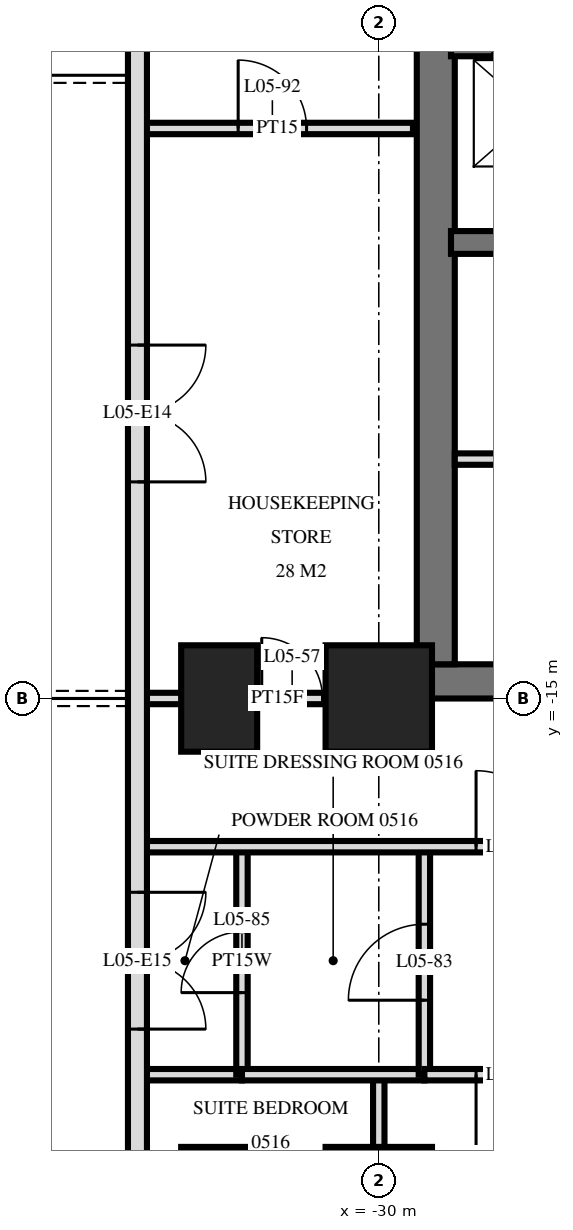
"""IFC4 building model, lengths in metres.
Left out: names, types, materials, properties, quantities, classifications, styles, units other than length and angle.
Written with IfcOpenShell. Run it as: python <this file> out.ifc"""

import sys

from ifc_helpers import new_model, si_unit, direction, frame, frame_2d, origin, origin_2d, place, context, subcontext, project, spatial, rectangle, extrude, element, fill, save


model = new_model("IFC4")
c1 = context("Model", 3, precision=1e-05, world=origin(), true_north=direction((0.0, 1.0)))
c2 = subcontext(c1, "Body", "Model", "MODEL_VIEW")
j1 = project(units=[si_unit("LENGTHUNIT", "METRE"), si_unit("PLANEANGLEUNIT", "RADIAN")], contexts=[c1])
p1 = place(None, origin())
s1 = spatial("IfcSite", under=j1, at=p1, CompositionType="ELEMENT")
p2 = place(p1, origin())
s2 = spatial("IfcBuilding", under=s1, at=p2, CompositionType="ELEMENT")
p3 = place(p2, frame((0.0, 0.0, 27.6)))
s3 = spatial("IfcBuildingStorey", under=s2, at=p3, CompositionType="ELEMENT", Elevation=27.6)
for number, where, z_axis, x_axis in (
    (1, (-32.1, -21.6, 0.0), (0.0, 0.0, 1.0), (0.0, 1.0, 0.0)),
    (2, (-32.1, -15.0, 0.0), (0.0, 0.0, 1.0), (0.0, 1.0, 0.0)),
):
    element("IfcColumn", number, at=place(p3, frame(where, z_axis=z_axis, x_axis=x_axis)), inside=s3, PredefinedType="COLUMN", context=c2, shape_type="SweptSolid", body=[
        extrude(rectangle(XDim=1.4, YDim=1.0, at=origin_2d()), origin(), (0.0, 0.0, 1.0), 3.6),
    ])
for number, where, z_axis, x_axis in (
    (3, (-30.0, -21.6, 0.0), (0.0, 0.0, 1.0), (1.0, 0.0, 0.0)),
    (4, (-30.0, -15.0, 0.0), (0.0, 0.0, 1.0), (1.0, 0.0, 0.0)),
):
    element("IfcColumn", number, at=place(p3, frame(where, z_axis=z_axis, x_axis=x_axis)), inside=s3, PredefinedType="COLUMN", context=c2, shape_type="SweptSolid", body=[
        extrude(rectangle(XDim=1.4, YDim=1.4, at=origin_2d()), origin(), (0.0, 0.0, 1.0), 3.6),
    ])
p4 = place(p3, frame((-29.5, -14.775, 0.0), z_axis=(0.0, 0.0, 1.0), x_axis=(1.0, 0.0, 0.0)))
e5 = element("IfcWall", 5, at=p4, inside=s3, PredefinedType="SHEAR", context=c2, shape_type="SweptSolid", body=[
    extrude(rectangle(XDim=19.5, YDim=0.45, at=frame_2d((9.75, 0.0))), origin(), (0.0, 0.0, 1.0), 3.6),
])
p5 = place(p4, frame((11.2, 0.0, 0.0)))
e6 = element("IfcOpeningElement", 6, at=p5, cuts=e5, PredefinedType="OPENING", context=c2, shape_type="SweptSolid", body=[
    extrude(rectangle(XDim=1.2, YDim=2.1, at=frame_2d((0.6, 1.05))), frame((0.0, 0.235, 0.0), z_axis=(0.0, -1.0, 0.0), x_axis=(1.0, 0.0, 0.0)), (0.0, 0.0, 1.0), 0.47),
])
p6 = place(p4, frame((14.25, 0.0, 0.0)))
e7 = element("IfcOpeningElement", 7, at=p6, cuts=e5, PredefinedType="OPENING", context=c2, shape_type="SweptSolid", body=[
    extrude(rectangle(XDim=1.1, YDim=2.1, at=frame_2d((0.55, 1.05))), frame((0.0, 0.235, 0.0), z_axis=(0.0, -1.0, 0.0), x_axis=(1.0, 0.0, 0.0)), (0.0, 0.0, 1.0), 0.47),
])
p7 = place(p4, frame((8.5, 0.0, 0.0)))
e8 = element("IfcOpeningElement", 8, at=p7, cuts=e5, PredefinedType="OPENING", context=c2, shape_type="SweptSolid", body=[
    extrude(rectangle(XDim=0.9, YDim=2.1, at=frame_2d((0.45, 1.05))), frame((0.0, 0.235, 0.0), z_axis=(0.0, -1.0, 0.0), x_axis=(1.0, 0.0, 0.0)), (0.0, 0.0, 1.0), 0.47),
])
p8 = place(p4, frame((6.05, 0.0, 0.0)))
e9 = element("IfcOpeningElement", 9, at=p8, cuts=e5, PredefinedType="OPENING", context=c2, shape_type="SweptSolid", body=[
    extrude(rectangle(XDim=1.0, YDim=2.1, at=frame_2d((0.5, 1.05))), frame((0.0, 0.235, 0.0), z_axis=(0.0, -1.0, 0.0), x_axis=(1.0, 0.0, 0.0)), (0.0, 0.0, 1.0), 0.47),
])
p9 = place(p4, frame((2.25, 0.0, 0.0)))
e10 = element("IfcOpeningElement", 10, at=p9, cuts=e5, PredefinedType="OPENING", context=c2, shape_type="SweptSolid", body=[
    extrude(rectangle(XDim=1.0, YDim=2.1, at=frame_2d((0.5, 1.05))), frame((0.0, 0.235, 0.0), z_axis=(0.0, -1.0, 0.0), x_axis=(1.0, 0.0, 0.0)), (0.0, 0.0, 1.0), 0.47),
])
p10 = place(p3, frame((-29.25, -14.55, 0.0), z_axis=(0.0, 0.0, 1.0), x_axis=(0.0, 1.0, 0.0)))
e11 = element("IfcWall", 11, at=p10, inside=s3, PredefinedType="SHEAR", context=c2, shape_type="SweptSolid", body=[
    extrude(rectangle(XDim=14.1, YDim=0.5, at=frame_2d((7.05, 0.0))), origin(), (0.0, 0.0, 1.0), 3.6),
])
p11 = place(p3, frame((-29.05, -6.4, 0.0), z_axis=(0.0, 0.0, 1.0), x_axis=(1.0, 0.0, 0.0)))
e12 = element("IfcWall", 12, at=p11, inside=s3, PredefinedType="SHEAR", context=c2, shape_type="SweptSolid", body=[
    extrude(rectangle(XDim=18.7, YDim=0.3, at=frame_2d((9.35, 0.0))), origin(), (0.0, 0.0, 1.0), 3.6),
])
p12 = place(p11, frame((2.95, 0.0, 0.0)))
e13 = element("IfcOpeningElement", 13, at=p12, cuts=e12, PredefinedType="OPENING", context=c2, shape_type="SweptSolid", body=[
    extrude(rectangle(XDim=1.1, YDim=2.1, at=frame_2d((0.55, 1.05))), frame((0.0, 0.16, 0.0), z_axis=(0.0, -1.0, 0.0), x_axis=(1.0, 0.0, 0.0)), (0.0, 0.0, 1.0), 0.32),
])
p13 = place(p11, frame((0.55, 0.0, 0.0)))
e14 = element("IfcOpeningElement", 14, at=p13, cuts=e12, PredefinedType="OPENING", context=c2, shape_type="SweptSolid", body=[
    extrude(rectangle(XDim=1.1, YDim=2.1, at=frame_2d((0.55, 1.05))), frame((0.0, 0.16, 0.0), z_axis=(0.0, -1.0, 0.0), x_axis=(1.0, 0.0, 0.0)), (0.0, 0.0, 1.0), 0.32),
])
p14 = place(p11, frame((10.8, 0.0, 0.0)))
e15 = element("IfcOpeningElement", 15, at=p14, cuts=e12, PredefinedType="OPENING", context=c2, shape_type="SweptSolid", body=[
    extrude(rectangle(XDim=1.1, YDim=2.1, at=frame_2d((0.55, 1.05))), frame((0.0, 0.16, 0.0), z_axis=(0.0, -1.0, 0.0), x_axis=(1.0, 0.0, 0.0)), (0.0, 0.0, 1.0), 0.32),
])
p15 = place(p11, frame((5.6, 0.0, 0.0)))
e16 = element("IfcOpeningElement", 16, at=p15, cuts=e12, PredefinedType="OPENING", context=c2, shape_type="SweptSolid", body=[
    extrude(rectangle(XDim=1.0, YDim=2.1, at=frame_2d((0.5, 1.05))), frame((0.0, 0.16, 0.0), z_axis=(0.0, -1.0, 0.0), x_axis=(1.0, 0.0, 0.0)), (0.0, 0.0, 1.0), 0.32),
])
p16 = place(p3, frame((-29.05, -9.0, 0.0), z_axis=(0.0, 0.0, 1.0), x_axis=(1.0, 0.0, 0.0)))
e17 = element("IfcWall", 17, at=p16, inside=s3, PredefinedType="SHEAR", context=c2, shape_type="SweptSolid", body=[
    extrude(rectangle(XDim=18.7, YDim=0.3, at=frame_2d((9.35, 0.0))), origin(), (0.0, 0.0, 1.0), 3.6),
])
p17 = place(p16, frame((13.8, 0.0, 0.0)))
e18 = element("IfcOpeningElement", 18, at=p17, cuts=e17, PredefinedType="OPENING", context=c2, shape_type="SweptSolid", body=[
    extrude(rectangle(XDim=1.1, YDim=2.1, at=frame_2d((0.55, 1.05))), frame((0.0, 0.16, 0.0), z_axis=(0.0, -1.0, 0.0), x_axis=(1.0, 0.0, 0.0)), (0.0, 0.0, 1.0), 0.32),
])
p18 = place(p3, frame((-33.175, -3.325, 0.0), z_axis=(0.0, 0.0, 1.0), x_axis=(0.0, -1.0, 0.0)))
e19 = element("IfcWall", 19, at=p18, inside=s3, PredefinedType="SOLIDWALL", context=c2, shape_type="SweptSolid", body=[
    extrude(rectangle(XDim=21.551, YDim=0.25, at=frame_2d((10.775, 0.0))), origin(), (0.0, 0.0, 1.0), 3.32),
])
p19 = place(p18, frame((7.025, 0.0, 0.0)))
e20 = element("IfcOpeningElement", 20, at=p19, cuts=e19, PredefinedType="OPENING", context=c2, shape_type="SweptSolid", body=[
    extrude(rectangle(XDim=1.8, YDim=2.4, at=frame_2d((0.9, 1.2))), frame((0.0, 0.135, 0.0), z_axis=(0.0, -1.0, 0.0), x_axis=(1.0, 0.0, 0.0)), (0.0, 0.0, 1.0), 0.27),
])
p20 = place(p18, frame((14.225, 0.0, 0.0)))
e21 = element("IfcOpeningElement", 21, at=p20, cuts=e19, PredefinedType="OPENING", context=c2, shape_type="SweptSolid", body=[
    extrude(rectangle(XDim=1.8, YDim=2.4, at=frame_2d((0.9, 1.2))), frame((0.0, 0.135, 0.0), z_axis=(0.0, -1.0, 0.0), x_axis=(1.0, 0.0, 0.0)), (0.0, 0.0, 1.0), 0.27),
])
p21 = place(p18, frame((18.875, 0.0, 0.0)))
e22 = element("IfcOpeningElement", 22, at=p21, cuts=e19, PredefinedType="OPENING", context=c2, shape_type="SweptSolid", body=[
    extrude(rectangle(XDim=1.8, YDim=2.4, at=frame_2d((0.9, 1.2))), frame((0.0, 0.135, 0.0), z_axis=(0.0, -1.0, 0.0), x_axis=(1.0, 0.0, 0.0)), (0.0, 0.0, 1.0), 0.27),
])
p22 = place(p3, frame((-29.0, -11.85, 0.0), z_axis=(0.0, 0.0, 1.0), x_axis=(1.0, 0.0, 0.0)))
e23 = element("IfcWall", 23, at=p22, inside=s3, PredefinedType="PARTITIONING", context=c2, shape_type="SweptSolid", body=[
    extrude(rectangle(XDim=4.5, YDim=0.15, at=frame_2d((2.25, 0.0))), origin(), (0.0, 0.0, 1.0), 3.3),
])
p23 = place(p22, frame((1.75, 0.0, 0.0)))
e24 = element("IfcOpeningElement", 24, at=p23, cuts=e23, PredefinedType="OPENING", context=c2, shape_type="SweptSolid", body=[
    extrude(rectangle(XDim=1.0, YDim=2.1, at=frame_2d((0.5, 1.05))), frame((0.0, 0.085, 0.0), z_axis=(0.0, -1.0, 0.0), x_axis=(1.0, 0.0, 0.0)), (0.0, 0.0, 1.0), 0.17),
])
p24 = place(p3, frame((-29.4, -19.95, 0.0), z_axis=(0.0, 0.0, 1.0), x_axis=(0.0, 1.0, 0.0)))
e25 = element("IfcWall", 25, at=p24, inside=s3, PredefinedType="PARTITIONING", context=c2, shape_type="SweptSolid", body=[
    extrude(rectangle(XDim=3.0, YDim=0.15, at=frame_2d((1.5, 0.0))), origin(), (0.0, 0.0, 1.0), 3.32),
])
p25 = place(p24, frame((0.98, 0.0, 0.0)))
e26 = element("IfcOpeningElement", 26, at=p25, cuts=e25, PredefinedType="OPENING", context=c2, shape_type="SweptSolid", body=[
    extrude(rectangle(XDim=1.0, YDim=2.1, at=frame_2d((0.5, 1.05))), frame((0.0, 0.085, 0.0), z_axis=(0.0, -1.0, 0.0), x_axis=(1.0, 0.0, 0.0)), (0.0, 0.0, 1.0), 0.17),
])
p26 = place(p3, frame((-30.0, -28.978, 0.0), z_axis=(0.0, 0.0, 1.0), x_axis=(0.0, 1.0, 0.0)))
e27 = element("IfcWall", 27, at=p26, inside=s3, PredefinedType="PARTITIONING", context=c2, shape_type="SweptSolid", body=[
    extrude(rectangle(XDim=9.028, YDim=0.15, at=frame_2d((4.514, 0.0))), origin(), (0.0, 0.0, 1.0), 3.32),
])
p27 = place(p26, frame((3.987, 0.0, 0.0)))
e28 = element("IfcOpeningElement", 28, at=p27, cuts=e27, PredefinedType="OPENING", context=c2, shape_type="SweptSolid", body=[
    extrude(rectangle(XDim=0.9, YDim=2.1, at=frame_2d((0.45, 1.05))), frame((0.0, 0.085, 0.0), z_axis=(0.0, -1.0, 0.0), x_axis=(1.0, 0.0, 0.0)), (0.0, 0.0, 1.0), 0.17),
])
p28 = place(p3, frame((-31.8, -19.95, 0.0), z_axis=(0.0, 0.0, 1.0), x_axis=(0.0, 1.0, 0.0)))
e29 = element("IfcWall", 29, at=p28, inside=s3, PredefinedType="PLUMBINGWALL", context=c2, shape_type="SweptSolid", body=[
    extrude(rectangle(XDim=3.0, YDim=0.15, at=frame_2d((1.5, 0.0))), origin(), (0.0, 0.0, 1.0), 3.32),
])
p29 = place(p28, frame((1.08, 0.0, 0.0)))
e30 = element("IfcOpeningElement", 30, at=p29, cuts=e29, PredefinedType="OPENING", context=c2, shape_type="SweptSolid", body=[
    extrude(rectangle(XDim=0.8, YDim=2.1, at=frame_2d((0.4, 1.05))), frame((0.0, 0.085, 0.0), z_axis=(0.0, -1.0, 0.0), x_axis=(1.0, 0.0, 0.0)), (0.0, 0.0, 1.0), 0.17),
])
p30 = place(p3, frame((-29.4, -19.95, 0.0), z_axis=(0.0, 0.0, 1.0), x_axis=(1.0, 0.0, 0.0)))
e31 = element("IfcWall", 31, at=p30, inside=s3, PredefinedType="PARTITIONING", context=c2, shape_type="SweptSolid", body=[
    extrude(rectangle(XDim=2.4, YDim=0.15, at=frame_2d((1.2, 0.0))), origin(), (0.0, 0.0, 1.0), 3.32),
])
p31 = place(p30, frame((0.68, 0.0, 0.0)))
e32 = element("IfcOpeningElement", 32, at=p31, cuts=e31, PredefinedType="OPENING", context=c2, shape_type="SweptSolid", body=[
    extrude(rectangle(XDim=1.0, YDim=2.1, at=frame_2d((0.5, 1.05))), frame((0.0, 0.085, 0.0), z_axis=(0.0, -1.0, 0.0), x_axis=(1.0, 0.0, 0.0)), (0.0, 0.0, 1.0), 0.17),
])
p32 = place(p3, frame((-31.8, -19.95, 0.0), z_axis=(0.0, 0.0, 1.0), x_axis=(1.0, 0.0, 0.0)))
e33 = element("IfcWall", 33, at=p32, inside=s3, PredefinedType="PARTITIONING", context=c2, shape_type="SweptSolid", body=[
    extrude(rectangle(XDim=2.4, YDim=0.15, at=frame_2d((1.2, 0.0))), origin(), (0.0, 0.0, 1.0), 3.32),
])
p33 = place(p3, frame((-33.12, -19.95, 0.0), z_axis=(0.0, 0.0, 1.0), x_axis=(1.0, 0.0, 0.0)))
e34 = element("IfcWall", 34, at=p33, inside=s3, PredefinedType="PLUMBINGWALL", context=c2, shape_type="SweptSolid", body=[
    extrude(rectangle(XDim=1.32, YDim=0.15, at=frame_2d((0.66, 0.0))), origin(), (0.0, 0.0, 1.0), 3.32),
])
p34 = place(p3, frame((-33.12, -16.95, 0.0), z_axis=(0.0, 0.0, 1.0), x_axis=(1.0, 0.0, 0.0)))
e35 = element("IfcWall", 35, at=p34, inside=s3, PredefinedType="PARTITIONING", context=c2, shape_type="SweptSolid", body=[
    extrude(rectangle(XDim=66.24, YDim=0.15, at=frame_2d((33.12, 0.0))), origin(), (0.0, 0.0, 1.0), 3.32),
])
p35 = place(p34, frame((9.27, 0.0, 0.0)))
e36 = element("IfcOpeningElement", 36, at=p35, cuts=e35, PredefinedType="OPENING", context=c2, shape_type="SweptSolid", body=[
    extrude(rectangle(XDim=1.0, YDim=2.1, at=frame_2d((0.5, 1.05))), frame((0.0, 0.085, 0.0), z_axis=(0.0, -1.0, 0.0), x_axis=(1.0, 0.0, 0.0)), (0.0, 0.0, 1.0), 0.17),
])
p36 = place(p34, frame((13.97, 0.0, 0.0)))
e37 = element("IfcOpeningElement", 37, at=p36, cuts=e35, PredefinedType="OPENING", context=c2, shape_type="SweptSolid", body=[
    extrude(rectangle(XDim=1.0, YDim=2.1, at=frame_2d((0.5, 1.05))), frame((0.0, 0.085, 0.0), z_axis=(0.0, -1.0, 0.0), x_axis=(1.0, 0.0, 0.0)), (0.0, 0.0, 1.0), 0.17),
])
p37 = place(p34, frame((15.27, 0.0, 0.0)))
e38 = element("IfcOpeningElement", 38, at=p37, cuts=e35, PredefinedType="OPENING", context=c2, shape_type="SweptSolid", body=[
    extrude(rectangle(XDim=1.0, YDim=2.1, at=frame_2d((0.5, 1.05))), frame((0.0, 0.085, 0.0), z_axis=(0.0, -1.0, 0.0), x_axis=(1.0, 0.0, 0.0)), (0.0, 0.0, 1.0), 0.17),
])
p38 = place(p34, frame((19.97, 0.0, 0.0)))
e39 = element("IfcOpeningElement", 39, at=p38, cuts=e35, PredefinedType="OPENING", context=c2, shape_type="SweptSolid", body=[
    extrude(rectangle(XDim=1.0, YDim=2.1, at=frame_2d((0.5, 1.05))), frame((0.0, 0.085, 0.0), z_axis=(0.0, -1.0, 0.0), x_axis=(1.0, 0.0, 0.0)), (0.0, 0.0, 1.0), 0.17),
])
p39 = place(p34, frame((22.27, 0.0, 0.0)))
e40 = element("IfcOpeningElement", 40, at=p39, cuts=e35, PredefinedType="OPENING", context=c2, shape_type="SweptSolid", body=[
    extrude(rectangle(XDim=1.0, YDim=2.1, at=frame_2d((0.5, 1.05))), frame((0.0, 0.085, 0.0), z_axis=(0.0, -1.0, 0.0), x_axis=(1.0, 0.0, 0.0)), (0.0, 0.0, 1.0), 0.17),
])
p40 = place(p34, frame((28.97, 0.0, 0.0)))
e41 = element("IfcOpeningElement", 41, at=p40, cuts=e35, PredefinedType="OPENING", context=c2, shape_type="SweptSolid", body=[
    extrude(rectangle(XDim=1.0, YDim=2.1, at=frame_2d((0.5, 1.05))), frame((0.0, 0.085, 0.0), z_axis=(0.0, -1.0, 0.0), x_axis=(1.0, 0.0, 0.0)), (0.0, 0.0, 1.0), 0.17),
])
p41 = place(p34, frame((30.27, 0.0, 0.0)))
e42 = element("IfcOpeningElement", 42, at=p41, cuts=e35, PredefinedType="OPENING", context=c2, shape_type="SweptSolid", body=[
    extrude(rectangle(XDim=1.0, YDim=2.1, at=frame_2d((0.5, 1.05))), frame((0.0, 0.085, 0.0), z_axis=(0.0, -1.0, 0.0), x_axis=(1.0, 0.0, 0.0)), (0.0, 0.0, 1.0), 0.17),
])
p42 = place(p34, frame((34.97, 0.0, 0.0)))
e43 = element("IfcOpeningElement", 43, at=p42, cuts=e35, PredefinedType="OPENING", context=c2, shape_type="SweptSolid", body=[
    extrude(rectangle(XDim=1.0, YDim=2.1, at=frame_2d((0.5, 1.05))), frame((0.0, 0.085, 0.0), z_axis=(0.0, -1.0, 0.0), x_axis=(1.0, 0.0, 0.0)), (0.0, 0.0, 1.0), 0.17),
])
p43 = place(p34, frame((36.27, 0.0, 0.0)))
e44 = element("IfcOpeningElement", 44, at=p43, cuts=e35, PredefinedType="OPENING", context=c2, shape_type="SweptSolid", body=[
    extrude(rectangle(XDim=1.0, YDim=2.1, at=frame_2d((0.5, 1.05))), frame((0.0, 0.085, 0.0), z_axis=(0.0, -1.0, 0.0), x_axis=(1.0, 0.0, 0.0)), (0.0, 0.0, 1.0), 0.17),
])
p44 = place(p34, frame((40.97, 0.0, 0.0)))
e45 = element("IfcOpeningElement", 45, at=p44, cuts=e35, PredefinedType="OPENING", context=c2, shape_type="SweptSolid", body=[
    extrude(rectangle(XDim=1.0, YDim=2.1, at=frame_2d((0.5, 1.05))), frame((0.0, 0.085, 0.0), z_axis=(0.0, -1.0, 0.0), x_axis=(1.0, 0.0, 0.0)), (0.0, 0.0, 1.0), 0.17),
])
p45 = place(p34, frame((42.27, 0.0, 0.0)))
e46 = element("IfcOpeningElement", 46, at=p45, cuts=e35, PredefinedType="OPENING", context=c2, shape_type="SweptSolid", body=[
    extrude(rectangle(XDim=1.0, YDim=2.1, at=frame_2d((0.5, 1.05))), frame((0.0, 0.085, 0.0), z_axis=(0.0, -1.0, 0.0), x_axis=(1.0, 0.0, 0.0)), (0.0, 0.0, 1.0), 0.17),
])
p46 = place(p34, frame((46.97, 0.0, 0.0)))
e47 = element("IfcOpeningElement", 47, at=p46, cuts=e35, PredefinedType="OPENING", context=c2, shape_type="SweptSolid", body=[
    extrude(rectangle(XDim=1.0, YDim=2.1, at=frame_2d((0.5, 1.05))), frame((0.0, 0.085, 0.0), z_axis=(0.0, -1.0, 0.0), x_axis=(1.0, 0.0, 0.0)), (0.0, 0.0, 1.0), 0.17),
])
p47 = place(p34, frame((48.27, 0.0, 0.0)))
e48 = element("IfcOpeningElement", 48, at=p47, cuts=e35, PredefinedType="OPENING", context=c2, shape_type="SweptSolid", body=[
    extrude(rectangle(XDim=1.0, YDim=2.1, at=frame_2d((0.5, 1.05))), frame((0.0, 0.085, 0.0), z_axis=(0.0, -1.0, 0.0), x_axis=(1.0, 0.0, 0.0)), (0.0, 0.0, 1.0), 0.17),
])
p48 = place(p34, frame((52.97, 0.0, 0.0)))
e49 = element("IfcOpeningElement", 49, at=p48, cuts=e35, PredefinedType="OPENING", context=c2, shape_type="SweptSolid", body=[
    extrude(rectangle(XDim=1.0, YDim=2.1, at=frame_2d((0.5, 1.05))), frame((0.0, 0.085, 0.0), z_axis=(0.0, -1.0, 0.0), x_axis=(1.0, 0.0, 0.0)), (0.0, 0.0, 1.0), 0.17),
])
p49 = place(p34, frame((54.27, 0.0, 0.0)))
e50 = element("IfcOpeningElement", 50, at=p49, cuts=e35, PredefinedType="OPENING", context=c2, shape_type="SweptSolid", body=[
    extrude(rectangle(XDim=1.0, YDim=2.1, at=frame_2d((0.5, 1.05))), frame((0.0, 0.085, 0.0), z_axis=(0.0, -1.0, 0.0), x_axis=(1.0, 0.0, 0.0)), (0.0, 0.0, 1.0), 0.17),
])
p50 = place(p34, frame((4.4, 0.0, 0.0)))
e51 = element("IfcOpeningElement", 51, at=p50, cuts=e35, PredefinedType="OPENING", context=c2, shape_type="SweptSolid", body=[
    extrude(rectangle(XDim=1.0, YDim=2.1, at=frame_2d((0.5, 1.05))), frame((0.0, 0.085, 0.0), z_axis=(0.0, -1.0, 0.0), x_axis=(1.0, 0.0, 0.0)), (0.0, 0.0, 1.0), 0.17),
])
p51 = place(p34, frame((60.8, 0.0, 0.0)))
e52 = element("IfcOpeningElement", 52, at=p51, cuts=e35, PredefinedType="OPENING", context=c2, shape_type="SweptSolid", body=[
    extrude(rectangle(XDim=1.0, YDim=2.1, at=frame_2d((0.5, 1.05))), frame((0.0, 0.085, 0.0), z_axis=(0.0, -1.0, 0.0), x_axis=(1.0, 0.0, 0.0)), (0.0, 0.0, 1.0), 0.17),
])
p52 = place(p3, frame((-33.12, -15.0, 0.0), z_axis=(0.0, 0.0, 1.0), x_axis=(1.0, 0.0, 0.0)))
e53 = element("IfcWall", 53, at=p52, inside=s3, PredefinedType="PARTITIONING", context=c2, shape_type="SweptSolid", body=[
    extrude(rectangle(XDim=3.57, YDim=0.15, at=frame_2d((1.785, 0.0))), origin(), (0.0, 0.0, 1.0), 3.32),
])
p53 = place(p52, frame((1.58, 0.0, 0.0)))
e54 = element("IfcOpeningElement", 54, at=p53, cuts=e53, PredefinedType="OPENING", context=c2, shape_type="SweptSolid", body=[
    extrude(rectangle(XDim=0.8, YDim=2.1, at=frame_2d((0.4, 1.05))), frame((0.0, 0.085, 0.0), z_axis=(0.0, -1.0, 0.0), x_axis=(1.0, 0.0, 0.0)), (0.0, 0.0, 1.0), 0.17),
])
p54 = place(p3, frame((-33.12, -7.5, 0.0), z_axis=(0.0, 0.0, 1.0), x_axis=(1.0, 0.0, 0.0)))
e55 = element("IfcWall", 55, at=p54, inside=s3, PredefinedType="PARTITIONING", context=c2, shape_type="SweptSolid", body=[
    extrude(rectangle(XDim=3.57, YDim=0.15, at=frame_2d((1.785, 0.0))), origin(), (0.0, 0.0, 1.0), 3.32),
])
p55 = place(p54, frame((1.27, 0.0, 0.0)))
e56 = element("IfcOpeningElement", 56, at=p55, cuts=e55, PredefinedType="OPENING", context=c2, shape_type="SweptSolid", body=[
    extrude(rectangle(XDim=0.9, YDim=2.1, at=frame_2d((0.45, 1.05))), frame((0.0, 0.085, 0.0), z_axis=(0.0, -1.0, 0.0), x_axis=(1.0, 0.0, 0.0)), (0.0, 0.0, 1.0), 0.17),
])
p56 = place(p19, origin())
e57 = element("IfcDoor", 57, at=p56, inside=s3, OperationType="DOUBLE_DOOR_SINGLE_SWING", PredefinedType="DOOR", context=c2, shape_type="SweptSolid", body=[
    extrude(rectangle(XDim=1.8, YDim=2.4, at=frame_2d((0.9, 1.2))), frame((0.0, 0.025, 0.0), z_axis=(0.0, -1.0, 0.0), x_axis=(1.0, 0.0, 0.0)), (0.0, 0.0, 1.0), 0.05),
])
fill(e20, e57)
p57 = place(p20, origin())
e58 = element("IfcDoor", 58, at=p57, inside=s3, OperationType="DOUBLE_DOOR_SINGLE_SWING", PredefinedType="DOOR", context=c2, shape_type="SweptSolid", body=[
    extrude(rectangle(XDim=1.8, YDim=2.4, at=frame_2d((0.9, 1.2))), frame((0.0, 0.025, 0.0), z_axis=(0.0, -1.0, 0.0), x_axis=(1.0, 0.0, 0.0)), (0.0, 0.0, 1.0), 0.05),
])
fill(e21, e58)
p58 = place(p50, origin())
e59 = element("IfcDoor", 59, at=p58, inside=s3, OperationType="SINGLE_SWING_RIGHT", PredefinedType="DOOR", context=c2, shape_type="SweptSolid", body=[
    extrude(rectangle(XDim=1.0, YDim=2.1, at=frame_2d((0.5, 1.05))), frame((0.0, 0.025, 0.0), z_axis=(0.0, -1.0, 0.0), x_axis=(1.0, 0.0, 0.0)), (0.0, 0.0, 1.0), 0.05),
])
fill(e51, e59)
p59 = place(p53, origin())
e60 = element("IfcDoor", 60, at=p59, inside=s3, OperationType="SINGLE_SWING_RIGHT", PredefinedType="DOOR", context=c2, shape_type="SweptSolid", body=[
    extrude(rectangle(XDim=0.8, YDim=2.1, at=frame_2d((0.4, 1.05))), frame((0.0, 0.025, 0.0), z_axis=(0.0, -1.0, 0.0), x_axis=(1.0, 0.0, 0.0)), (0.0, 0.0, 1.0), 0.05),
])
fill(e54, e60)
p60 = place(p25, origin())
e61 = element("IfcDoor", 61, at=p60, inside=s3, OperationType="SINGLE_SWING_RIGHT", PredefinedType="DOOR", context=c2, shape_type="SweptSolid", body=[
    extrude(rectangle(XDim=1.0, YDim=2.1, at=frame_2d((0.5, 1.05))), frame((0.0, 0.025, 0.0), z_axis=(0.0, -1.0, 0.0), x_axis=(1.0, 0.0, 0.0)), (0.0, 0.0, 1.0), 0.05),
])
fill(e26, e61)
p61 = place(p31, frame((0.5, 0.0, 0.0), z_axis=(0.0, 0.0, 1.0), x_axis=(-1.0, 0.0, 0.0)))
e62 = element("IfcDoor", 62, at=p61, inside=s3, OperationType="SINGLE_SWING_LEFT", PredefinedType="DOOR", context=c2, shape_type="SweptSolid", body=[
    extrude(rectangle(XDim=1.0, YDim=2.1, at=frame_2d((0.0, 1.05))), frame((0.0, -0.025, 0.0), z_axis=(0.0, 1.0, 0.0), x_axis=(-1.0, 0.0, 0.0)), (0.0, 0.0, 1.0), 0.05),
])
fill(e32, e62)
p62 = place(p29, origin())
e63 = element("IfcDoor", 63, at=p62, inside=s3, OperationType="SINGLE_SWING_RIGHT", PredefinedType="DOOR", context=c2, shape_type="SweptSolid", body=[
    extrude(rectangle(XDim=0.8, YDim=2.1, at=frame_2d((0.4, 1.05))), frame((0.0, 0.025, 0.0), z_axis=(0.0, -1.0, 0.0), x_axis=(1.0, 0.0, 0.0)), (0.0, 0.0, 1.0), 0.05),
])
fill(e30, e63)
p63 = place(p55, origin())
e64 = element("IfcDoor", 64, at=p63, inside=s3, OperationType="SINGLE_SWING_RIGHT", PredefinedType="DOOR", context=c2, shape_type="SweptSolid", body=[
    extrude(rectangle(XDim=0.9, YDim=2.1, at=frame_2d((0.45, 1.05))), frame((0.0, 0.025, 0.0), z_axis=(0.0, -1.0, 0.0), x_axis=(1.0, 0.0, 0.0)), (0.0, 0.0, 1.0), 0.05),
])
fill(e56, e64)
save(model, sys.argv[1])
